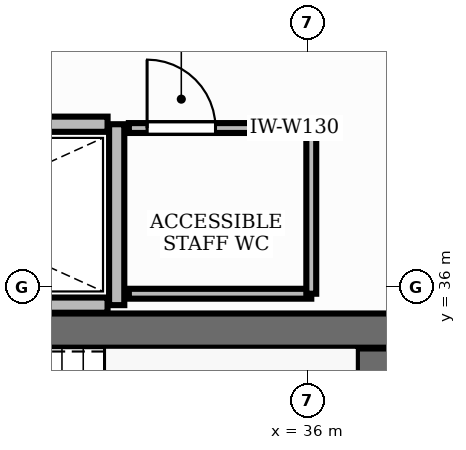
"""IFC4 building model, lengths in metres.
Left out: names, types, materials, properties, quantities, classifications, styles, units other than length and angle.
Written with IfcOpenShell. Run it as: python <this file> out.ifc"""

import sys

from ifc_helpers import new_model, si_unit, direction, frame, frame_2d, origin, place, context, subcontext, project, spatial, rectangle, extrude, element, fill, save


model = new_model("IFC4")
c1 = context("Model", 3, precision=1e-05, world=origin(), true_north=direction((0.0, 1.0)))
c2 = subcontext(c1, "Body", "Model", "MODEL_VIEW")
j1 = project(units=[si_unit("LENGTHUNIT", "METRE"), si_unit("PLANEANGLEUNIT", "RADIAN")], contexts=[c1])
p1 = place(None, origin())
s1 = spatial("IfcSite", under=j1, at=p1, CompositionType="ELEMENT")
p2 = place(p1, origin())
s2 = spatial("IfcBuilding", under=s1, at=p2, CompositionType="ELEMENT")
p3 = place(p2, frame((0.0, 0.0, 46.8)))
s3 = spatial("IfcBuildingStorey", under=s2, at=p3, CompositionType="ELEMENT", Elevation=46.8)
p4 = place(p3, frame((28.852, 35.425, 0.0), z_axis=(0.0, 0.0, 1.0), x_axis=(1.0, 0.0, 0.0)))
e1 = element("IfcWall", 1, at=p4, inside=s3, PredefinedType="SHEAR", context=c2, shape_type="SweptSolid", body=[
    extrude(rectangle(XDim=8.248, YDim=0.45, at=frame_2d((4.124, 0.0))), origin(), (0.0, 0.0, 1.0), 3.9),
])
p5 = place(p3, frame((36.875, 32.11, 0.0), z_axis=(0.0, 0.0, 1.0), x_axis=(0.0, 1.0, 0.0)))
e2 = element("IfcWall", 2, at=p5, inside=s3, PredefinedType="SHEAR", context=c2, shape_type="SweptSolid", body=[
    extrude(rectangle(XDim=3.08, YDim=0.45, at=frame_2d((1.54, 0.0))), origin(), (0.0, 0.0, 1.0), 3.9),
])
p6 = place(p3, frame((33.49, 35.76, 0.0), z_axis=(0.0, 0.0, 1.0), x_axis=(0.0, 1.0, 0.0)))
e3 = element("IfcWall", 3, at=p6, inside=s3, PredefinedType="PARTITIONING", context=c2, shape_type="SweptSolid", body=[
    extrude(rectangle(XDim=2.38, YDim=0.2, at=frame_2d((1.19, 0.0))), origin(), (0.0, 0.0, 1.0), 2.91),
])
for number, where, z_axis, x_axis in (
    (4, (28.8, 35.76, 0.0), (0.0, 0.0, 1.0), (1.0, 0.0, 0.0)),
    (5, (28.8, 38.14, 0.0), (0.0, 0.0, 1.0), (1.0, 0.0, 0.0)),
):
    element("IfcWall", number, at=place(p3, frame(where, z_axis=z_axis, x_axis=x_axis)), inside=s3, PredefinedType="PARTITIONING", context=c2, shape_type="SweptSolid", body=[
        extrude(rectangle(XDim=4.57, YDim=0.2, at=frame_2d((2.285, 0.0))), origin(), (0.0, 0.0, 1.0), 2.91),
    ])
p7 = place(p3, frame((33.65, 38.09, 0.0), z_axis=(0.0, 0.0, 1.0), x_axis=(1.0, 0.0, 0.0)))
e6 = element("IfcWall", 6, at=p7, inside=s3, PredefinedType="PARTITIONING", context=c2, shape_type="SweptSolid", body=[
    extrude(rectangle(XDim=2.4, YDim=0.13, at=frame_2d((1.2, 0.0))), origin(), (0.0, 0.0, 1.0), 2.91),
])
p8 = place(p7, frame((0.24, 0.0, 0.0)))
e7 = element("IfcOpeningElement", 7, at=p8, cuts=e6, PredefinedType="OPENING", context=c2, shape_type="SweptSolid", body=[
    extrude(rectangle(XDim=0.9, YDim=2.15, at=frame_2d((0.45, 1.075))), frame((0.0, 0.08, 0.0), z_axis=(0.0, -1.0, 0.0), x_axis=(1.0, 0.0, 0.0)), (0.0, 0.0, 1.0), 0.16),
])
p9 = place(p3, frame((36.05, 35.91, 0.0), z_axis=(0.0, 0.0, 1.0), x_axis=(-1.0, 0.0, 0.0)))
e8 = element("IfcWall", 8, at=p9, inside=s3, PredefinedType="PARTITIONING", context=c2, shape_type="SweptSolid", body=[
    extrude(rectangle(XDim=2.4, YDim=0.13, at=frame_2d((1.2, 0.0))), origin(), (0.0, 0.0, 1.0), 2.91),
])
p10 = place(p3, frame((36.05, 38.09, 0.0), z_axis=(0.0, 0.0, 1.0), x_axis=(0.0, -1.0, 0.0)))
e9 = element("IfcWall", 9, at=p10, inside=s3, PredefinedType="PARTITIONING", context=c2, shape_type="SweptSolid", body=[
    extrude(rectangle(XDim=2.18, YDim=0.13, at=frame_2d((1.09, 0.0))), origin(), (0.0, 0.0, 1.0), 2.91),
])
p11 = place(p8, origin())
e10 = element("IfcDoor", 10, at=p11, inside=s3, OperationType="SINGLE_SWING_LEFT", PredefinedType="DOOR", context=c2, shape_type="SweptSolid", body=[
    extrude(rectangle(XDim=0.9, YDim=2.15, at=frame_2d((0.45, 1.075))), frame((0.0, 0.025, 0.0), z_axis=(0.0, -1.0, 0.0), x_axis=(1.0, 0.0, 0.0)), (0.0, 0.0, 1.0), 0.05),
])
fill(e7, e10)
save(model, sys.argv[1])
